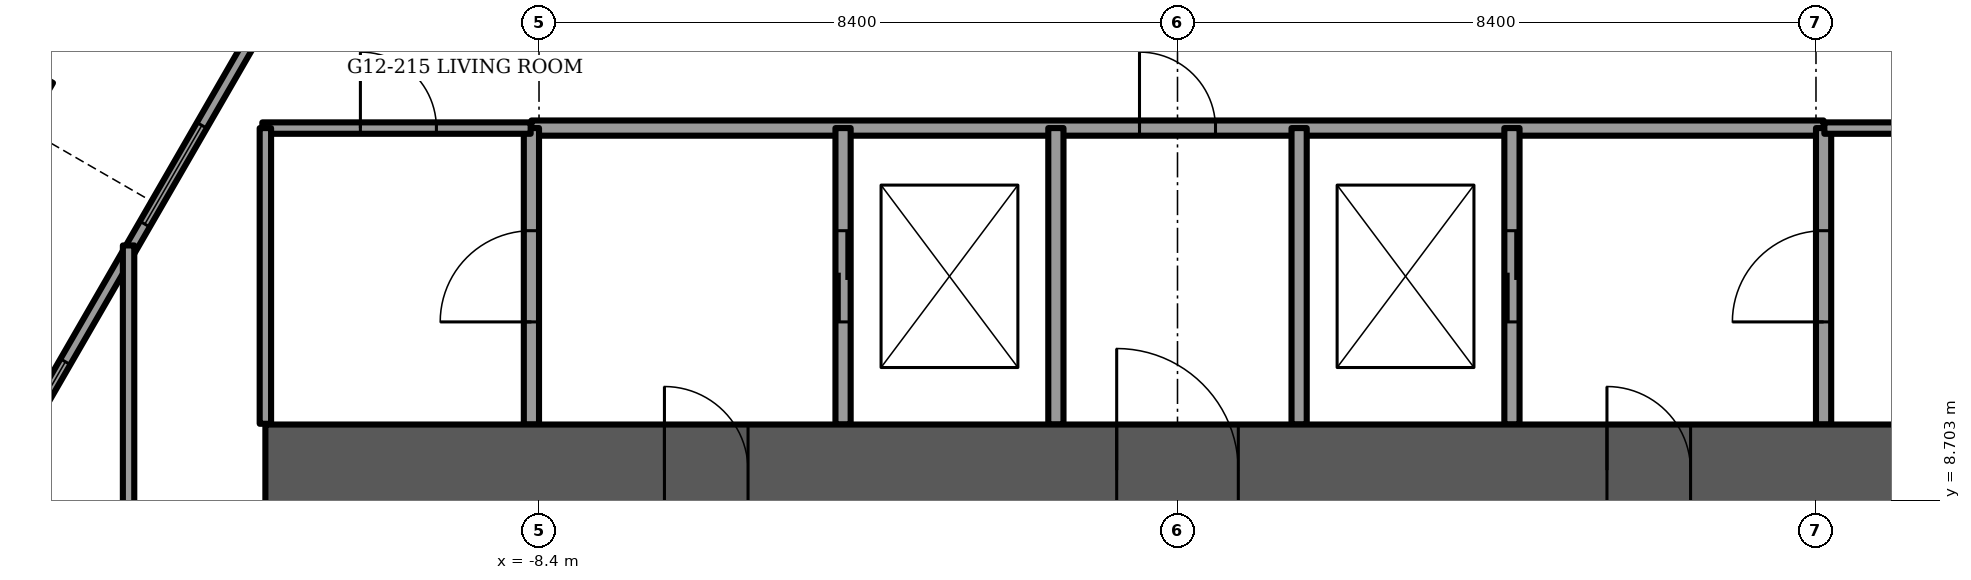
"""IFC4 building model, lengths in metres.
Left out: names, types, materials, properties, quantities, classifications, styles, units other than length and angle.
Written with IfcOpenShell. Run it as: python <this file> out.ifc"""

import sys

from ifc_helpers import new_model, si_unit, direction, frame, frame_2d, origin, origin_2d, place, context, subcontext, project, spatial, rectangle, extrude, element, fill, save


model = new_model("IFC4")
c1 = context("Model", 3, precision=1e-05, world=origin(), true_north=direction((0.0, 1.0)))
c2 = subcontext(c1, "Body", "Model", "MODEL_VIEW")
j1 = project(units=[si_unit("LENGTHUNIT", "METRE"), si_unit("PLANEANGLEUNIT", "RADIAN")], contexts=[c1])
p1 = place(None, origin())
s1 = spatial("IfcSite", under=j1, at=p1, CompositionType="ELEMENT")
p2 = place(p1, origin())
s2 = spatial("IfcBuilding", under=s1, at=p2, CompositionType="ELEMENT")
p3 = place(p2, frame((0.0, 0.0, 50.5)))
s3 = spatial("IfcBuildingStorey", under=s2, at=p3, CompositionType="ELEMENT", Elevation=50.5)
p4 = place(p3, frame((-15.75, 13.938, -1.2), z_axis=(0.0, 0.0, 1.0), x_axis=(0.5, 0.866025403784, 0.0)))
e1 = element("IfcColumn", 1, at=p4, inside=s3, PredefinedType="COLUMN", context=c2, shape_type="SweptSolid", body=[
    extrude(rectangle(XDim=1.4, YDim=1.4, at=origin_2d()), origin(), (0.0, 0.0, 1.0), 3.75),
])
p5 = place(p3, frame((-12.0, 9.1, -0.3), z_axis=(0.0, 0.0, 1.0), x_axis=(1.0, 0.0, 0.0)))
e2 = element("IfcWall", 2, at=p5, inside=s3, PredefinedType="SHEAR", context=c2, shape_type="SweptSolid", body=[
    extrude(rectangle(XDim=24.0, YDim=1.2, at=frame_2d((12.0, 0.0))), origin(), (0.0, 0.0, 1.0), 3.75),
])
p6 = place(p5, frame((11.2, 0.0, 0.0)))
e3 = element("IfcOpeningElement", 3, at=p6, cuts=e2, PredefinedType="OPENING", context=c2, shape_type="SweptSolid", body=[
    extrude(rectangle(XDim=1.6, YDim=2.1, at=frame_2d((0.8, 1.05))), frame((0.0, 0.6, 0.0), z_axis=(0.0, -1.0, 0.0), x_axis=(1.0, 0.0, 0.0)), (0.0, 0.0, 1.0), 1.2),
])
p7 = place(p5, frame((5.25, 0.0, 0.0)))
e4 = element("IfcOpeningElement", 4, at=p7, cuts=e2, PredefinedType="OPENING", context=c2, shape_type="SweptSolid", body=[
    extrude(rectangle(XDim=1.1, YDim=2.1, at=frame_2d((0.55, 1.05))), frame((0.0, 0.6, 0.0), z_axis=(0.0, -1.0, 0.0), x_axis=(1.0, 0.0, 0.0)), (0.0, 0.0, 1.0), 1.2),
])
p8 = place(p5, frame((17.65, 0.0, 0.0)))
e5 = element("IfcOpeningElement", 5, at=p8, cuts=e2, PredefinedType="OPENING", context=c2, shape_type="SweptSolid", body=[
    extrude(rectangle(XDim=1.1, YDim=2.1, at=frame_2d((0.55, 1.05))), frame((0.0, 0.6, 0.0), z_axis=(0.0, -1.0, 0.0), x_axis=(1.0, 0.0, 0.0)), (0.0, 0.0, 1.0), 1.2),
])
p9 = place(p3, frame((-12.138, 20.694, 0.0), z_axis=(0.0, 0.0, 1.0), x_axis=(-0.500009789943, -0.866019751484, 0.0)))
e6 = element("IfcWall", 6, at=p9, inside=s3, PredefinedType="PARAPET", context=c2, shape_type="SweptSolid", body=[
    extrude(rectangle(XDim=6.987, YDim=0.9, at=frame_2d((3.494, 0.0))), origin(), (0.0, 0.0, 1.0), 1.1),
])
p10 = place(p3, frame((-8.993, 20.292, 0.0), z_axis=(0.0, 0.0, 1.0), x_axis=(-0.49999960747, -0.866025630412, 0.0)))
e7 = element("IfcWall", 7, at=p10, inside=s3, PredefinedType="SOLIDWALL", context=c2, shape_type="SweptSolid", body=[
    extrude(rectangle(XDim=23.384, YDim=0.15, at=frame_2d((11.692, 0.0))), origin(), (0.0, 0.0, 1.0), 3.45),
])
p11 = place(p10, frame((3.825, 0.0, 0.15)))
e8 = element("IfcOpeningElement", 8, at=p11, cuts=e7, PredefinedType="OPENING", context=c2, shape_type="SweptSolid", body=[
    extrude(rectangle(XDim=1.5, YDim=2.85, at=frame_2d((0.75, 1.425))), frame((0.0, 0.075, 0.0), z_axis=(0.0, -1.0, 0.0), x_axis=(1.0, 0.0, 0.0)), (0.0, 0.0, 1.0), 0.15),
])
p12 = place(p10, frame((7.687, 0.0, 0.15)))
e9 = element("IfcOpeningElement", 9, at=p12, cuts=e7, PredefinedType="OPENING", context=c2, shape_type="SweptSolid", body=[
    extrude(rectangle(XDim=1.5, YDim=2.85, at=frame_2d((0.75, 1.425))), frame((0.0, 0.075, 0.0), z_axis=(0.0, -1.0, 0.0), x_axis=(1.0, 0.0, 0.0)), (0.0, 0.0, 1.0), 0.15),
])
p13 = place(p10, frame((11.278, 0.0, 0.15)))
e10 = element("IfcOpeningElement", 10, at=p13, cuts=e7, PredefinedType="OPENING", context=c2, shape_type="SweptSolid", body=[
    extrude(rectangle(XDim=1.8, YDim=2.85, at=frame_2d((0.9, 1.425))), frame((0.0, 0.075, 0.0), z_axis=(0.0, -1.0, 0.0), x_axis=(1.0, 0.0, 0.0)), (0.0, 0.0, 1.0), 0.15),
])
p14 = place(p10, frame((13.377, 0.0, 0.15)))
e11 = element("IfcOpeningElement", 11, at=p14, cuts=e7, PredefinedType="OPENING", context=c2, shape_type="SweptSolid", body=[
    extrude(rectangle(XDim=1.5, YDim=2.85, at=frame_2d((0.75, 1.425))), frame((0.0, 0.075, 0.0), z_axis=(0.0, -1.0, 0.0), x_axis=(1.0, 0.0, 0.0)), (0.0, 0.0, 1.0), 0.15),
])
p15 = place(p10, frame((15.478, 0.0, 0.15)))
e12 = element("IfcOpeningElement", 12, at=p15, cuts=e7, PredefinedType="OPENING", context=c2, shape_type="SweptSolid", body=[
    extrude(rectangle(XDim=1.8, YDim=2.85, at=frame_2d((0.9, 1.425))), frame((0.0, 0.075, 0.0), z_axis=(0.0, -1.0, 0.0), x_axis=(1.0, 0.0, 0.0)), (0.0, 0.0, 1.0), 0.15),
])
p16 = place(p10, frame((17.577, 0.0, 0.15)))
e13 = element("IfcOpeningElement", 13, at=p16, cuts=e7, PredefinedType="OPENING", context=c2, shape_type="SweptSolid", body=[
    extrude(rectangle(XDim=1.5, YDim=2.85, at=frame_2d((0.75, 1.425))), frame((0.0, 0.075, 0.0), z_axis=(0.0, -1.0, 0.0), x_axis=(1.0, 0.0, 0.0)), (0.0, 0.0, 1.0), 0.15),
])
p17 = place(p10, frame((0.339, 0.0, 0.15)))
e14 = element("IfcOpeningElement", 14, at=p17, cuts=e7, PredefinedType="OPENING", context=c2, shape_type="SweptSolid", body=[
    extrude(rectangle(XDim=1.8, YDim=2.73, at=frame_2d((0.9, 1.365))), frame((0.0, 0.075, 0.0), z_axis=(0.0, -1.0, 0.0), x_axis=(1.0, 0.0, 0.0)), (0.0, 0.0, 1.0), 0.15),
])
p18 = place(p10, frame((21.12, 0.0, 0.15)))
e15 = element("IfcOpeningElement", 15, at=p18, cuts=e7, PredefinedType="OPENING", context=c2, shape_type="SweptSolid", body=[
    extrude(rectangle(XDim=1.8, YDim=2.73, at=frame_2d((0.9, 1.365))), frame((0.0, 0.075, 0.0), z_axis=(0.0, -1.0, 0.0), x_axis=(1.0, 0.0, 0.0)), (0.0, 0.0, 1.0), 0.15),
])
p19 = place(p3, frame((20.685, 0.042, 0.0), z_axis=(0.0, 0.0, 1.0), x_axis=(-0.49999960747, 0.866025630412, 0.0)))
e16 = element("IfcWall", 16, at=p19, inside=s3, PredefinedType="SOLIDWALL", context=c2, shape_type="SweptSolid", body=[
    extrude(rectangle(XDim=23.384, YDim=0.15, at=frame_2d((11.692, 0.0))), origin(), (0.0, 0.0, 1.0), 3.45),
])
p20 = place(p19, frame((4.491, 0.0, 0.15)))
e17 = element("IfcOpeningElement", 17, at=p20, cuts=e16, PredefinedType="OPENING", context=c2, shape_type="SweptSolid", body=[
    extrude(rectangle(XDim=1.8, YDim=2.85, at=frame_2d((0.9, 1.425))), frame((0.0, 0.075, 0.0), z_axis=(0.0, -1.0, 0.0), x_axis=(1.0, 0.0, 0.0)), (0.0, 0.0, 1.0), 0.15),
])
p21 = place(p19, frame((6.406, 0.0, 0.15)))
e18 = element("IfcOpeningElement", 18, at=p21, cuts=e16, PredefinedType="OPENING", context=c2, shape_type="SweptSolid", body=[
    extrude(rectangle(XDim=1.5, YDim=2.85, at=frame_2d((0.75, 1.425))), frame((0.0, 0.075, 0.0), z_axis=(0.0, -1.0, 0.0), x_axis=(1.0, 0.0, 0.0)), (0.0, 0.0, 1.0), 0.15),
])
p22 = place(p19, frame((8.506, 0.0, 0.15)))
e19 = element("IfcOpeningElement", 19, at=p22, cuts=e16, PredefinedType="OPENING", context=c2, shape_type="SweptSolid", body=[
    extrude(rectangle(XDim=1.8, YDim=2.85, at=frame_2d((0.9, 1.425))), frame((0.0, 0.075, 0.0), z_axis=(0.0, -1.0, 0.0), x_axis=(1.0, 0.0, 0.0)), (0.0, 0.0, 1.0), 0.15),
])
p23 = place(p19, frame((10.606, 0.0, 0.15)))
e20 = element("IfcOpeningElement", 20, at=p23, cuts=e16, PredefinedType="OPENING", context=c2, shape_type="SweptSolid", body=[
    extrude(rectangle(XDim=1.5, YDim=2.85, at=frame_2d((0.75, 1.425))), frame((0.0, 0.075, 0.0), z_axis=(0.0, -1.0, 0.0), x_axis=(1.0, 0.0, 0.0)), (0.0, 0.0, 1.0), 0.15),
])
p24 = place(p19, frame((14.806, 0.0, 0.15)))
e21 = element("IfcOpeningElement", 21, at=p24, cuts=e16, PredefinedType="OPENING", context=c2, shape_type="SweptSolid", body=[
    extrude(rectangle(XDim=1.5, YDim=2.85, at=frame_2d((0.75, 1.425))), frame((0.0, 0.075, 0.0), z_axis=(0.0, -1.0, 0.0), x_axis=(1.0, 0.0, 0.0)), (0.0, 0.0, 1.0), 0.15),
])
p25 = place(p19, frame((18.861, 0.0, 0.15)))
e22 = element("IfcOpeningElement", 22, at=p25, cuts=e16, PredefinedType="OPENING", context=c2, shape_type="SweptSolid", body=[
    extrude(rectangle(XDim=1.5, YDim=2.85, at=frame_2d((0.75, 1.425))), frame((0.0, 0.075, 0.0), z_axis=(0.0, -1.0, 0.0), x_axis=(1.0, 0.0, 0.0)), (0.0, 0.0, 1.0), 0.15),
])
p26 = place(p19, frame((1.422, 0.0, 0.15)))
e23 = element("IfcOpeningElement", 23, at=p26, cuts=e16, PredefinedType="OPENING", context=c2, shape_type="SweptSolid", body=[
    extrude(rectangle(XDim=1.8, YDim=2.73, at=frame_2d((0.9, 1.365))), frame((0.0, 0.075, 0.0), z_axis=(0.0, -1.0, 0.0), x_axis=(1.0, 0.0, 0.0)), (0.0, 0.0, 1.0), 0.15),
])
p27 = place(p19, frame((21.247, 0.0, 0.15)))
e24 = element("IfcOpeningElement", 24, at=p27, cuts=e16, PredefinedType="OPENING", context=c2, shape_type="SweptSolid", body=[
    extrude(rectangle(XDim=1.8, YDim=2.73, at=frame_2d((0.9, 1.365))), frame((0.0, 0.075, 0.0), z_axis=(0.0, -1.0, 0.0), x_axis=(1.0, 0.0, 0.0)), (0.0, 0.0, 1.0), 0.15),
])
p28 = place(p3, frame((-8.5, 13.6, 0.0), z_axis=(0.0, 0.0, 1.0), x_axis=(1.0, 0.0, 0.0)))
e25 = element("IfcWall", 25, at=p28, inside=s3, PredefinedType="PARTITIONING", context=c2, shape_type="SweptSolid", body=[
    extrude(rectangle(XDim=17.0, YDim=0.2, at=frame_2d((8.5, 0.0))), origin(), (0.0, 0.0, 1.0), 3.45),
])
p29 = place(p28, frame((8.0, 0.0, 0.0)))
e26 = element("IfcOpeningElement", 26, at=p29, cuts=e25, PredefinedType="OPENING", context=c2, shape_type="SweptSolid", body=[
    extrude(rectangle(XDim=1.0, YDim=2.1, at=frame_2d((0.5, 1.05))), frame((0.0, 0.1, 0.0), z_axis=(0.0, -1.0, 0.0), x_axis=(1.0, 0.0, 0.0)), (0.0, 0.0, 1.0), 0.2),
])
p30 = place(p3, frame((-8.5, 9.7, 0.0), z_axis=(0.0, 0.0, 1.0), x_axis=(0.0, 1.0, 0.0)))
e27 = element("IfcWall", 27, at=p30, inside=s3, PredefinedType="PARTITIONING", context=c2, shape_type="SweptSolid", body=[
    extrude(rectangle(XDim=3.9, YDim=0.2, at=frame_2d((1.95, 0.0))), origin(), (0.0, 0.0, 1.0), 3.45),
])
p31 = place(p30, frame((1.35, 0.0, 0.0)))
e28 = element("IfcOpeningElement", 28, at=p31, cuts=e27, PredefinedType="OPENING", context=c2, shape_type="SweptSolid", body=[
    extrude(rectangle(XDim=1.2, YDim=2.1, at=frame_2d((0.6, 1.05))), frame((0.0, 0.1, 0.0), z_axis=(0.0, -1.0, 0.0), x_axis=(1.0, 0.0, 0.0)), (0.0, 0.0, 1.0), 0.2),
])
p32 = place(p3, frame((8.5, 9.7, 0.0), z_axis=(0.0, 0.0, 1.0), x_axis=(0.0, 1.0, 0.0)))
e29 = element("IfcWall", 29, at=p32, inside=s3, PredefinedType="PARTITIONING", context=c2, shape_type="SweptSolid", body=[
    extrude(rectangle(XDim=3.9, YDim=0.2, at=frame_2d((1.95, 0.0))), origin(), (0.0, 0.0, 1.0), 3.45),
])
p33 = place(p32, frame((1.35, 0.0, 0.0)))
e30 = element("IfcOpeningElement", 30, at=p33, cuts=e29, PredefinedType="OPENING", context=c2, shape_type="SweptSolid", body=[
    extrude(rectangle(XDim=1.2, YDim=2.1, at=frame_2d((0.6, 1.05))), frame((0.0, 0.1, 0.0), z_axis=(0.0, -1.0, 0.0), x_axis=(1.0, 0.0, 0.0)), (0.0, 0.0, 1.0), 0.2),
])
p34 = place(p3, frame((-4.4, 9.7, 0.0), z_axis=(0.0, 0.0, 1.0), x_axis=(0.0, 1.0, 0.0)))
e31 = element("IfcWall", 31, at=p34, inside=s3, PredefinedType="PARTITIONING", context=c2, shape_type="SweptSolid", body=[
    extrude(rectangle(XDim=3.9, YDim=0.2, at=frame_2d((1.95, 0.0))), origin(), (0.0, 0.0, 1.0), 3.45),
])
p35 = place(p34, frame((1.35, 0.0, 0.0)))
e32 = element("IfcOpeningElement", 32, at=p35, cuts=e31, PredefinedType="OPENING", context=c2, shape_type="SweptSolid", body=[
    extrude(rectangle(XDim=1.2, YDim=2.1, at=frame_2d((0.6, 1.05))), frame((0.0, 0.1, 0.0), z_axis=(0.0, -1.0, 0.0), x_axis=(1.0, 0.0, 0.0)), (0.0, 0.0, 1.0), 0.2),
])
p36 = place(p3, frame((4.4, 9.7, 0.0), z_axis=(0.0, 0.0, 1.0), x_axis=(0.0, 1.0, 0.0)))
e33 = element("IfcWall", 33, at=p36, inside=s3, PredefinedType="PARTITIONING", context=c2, shape_type="SweptSolid", body=[
    extrude(rectangle(XDim=3.9, YDim=0.2, at=frame_2d((1.95, 0.0))), origin(), (0.0, 0.0, 1.0), 3.45),
])
p37 = place(p36, frame((1.35, 0.0, 0.0)))
e34 = element("IfcOpeningElement", 34, at=p37, cuts=e33, PredefinedType="OPENING", context=c2, shape_type="SweptSolid", body=[
    extrude(rectangle(XDim=1.2, YDim=2.1, at=frame_2d((0.6, 1.05))), frame((0.0, 0.1, 0.0), z_axis=(0.0, -1.0, 0.0), x_axis=(1.0, 0.0, 0.0)), (0.0, 0.0, 1.0), 0.2),
])
for number, where, z_axis, x_axis in (
    (35, (-1.6, 9.7, 0.0), (0.0, 0.0, 1.0), (0.0, 1.0, 0.0)),
    (36, (1.6, 9.7, 0.0), (0.0, 0.0, 1.0), (0.0, 1.0, 0.0)),
):
    element("IfcWall", number, at=place(p3, frame(where, z_axis=z_axis, x_axis=x_axis)), inside=s3, PredefinedType="PARTITIONING", context=c2, shape_type="SweptSolid", body=[
        extrude(rectangle(XDim=3.9, YDim=0.2, at=frame_2d((1.95, 0.0))), origin(), (0.0, 0.0, 1.0), 3.45),
    ])
p38 = place(p3, frame((-12.04, 13.6, 0.0), z_axis=(0.0, 0.0, 1.0), x_axis=(1.0, 0.0, 0.0)))
e37 = element("IfcWall", 37, at=p38, inside=s3, PredefinedType="PARTITIONING", context=c2, shape_type="SweptSolid", body=[
    extrude(rectangle(XDim=3.53, YDim=0.15, at=frame_2d((1.765, 0.0))), origin(), (0.0, 0.0, 1.0), 3.45),
])
p39 = place(p38, frame((1.29, 0.0, 0.0)))
e38 = element("IfcOpeningElement", 38, at=p39, cuts=e37, PredefinedType="OPENING", context=c2, shape_type="SweptSolid", body=[
    extrude(rectangle(XDim=1.0, YDim=2.1, at=frame_2d((0.5, 1.05))), frame((0.0, 0.075, 0.0), z_axis=(0.0, -1.0, 0.0), x_axis=(1.0, 0.0, 0.0)), (0.0, 0.0, 1.0), 0.15),
])
p40 = place(p3, frame((8.51, 13.6, 0.0), z_axis=(0.0, 0.0, 1.0), x_axis=(1.0, 0.0, 0.0)))
e39 = element("IfcWall", 39, at=p40, inside=s3, PredefinedType="PARTITIONING", context=c2, shape_type="SweptSolid", body=[
    extrude(rectangle(XDim=3.53, YDim=0.15, at=frame_2d((1.765, 0.0))), origin(), (0.0, 0.0, 1.0), 3.45),
])
p41 = place(p40, frame((1.24, 0.0, 0.0)))
e40 = element("IfcOpeningElement", 40, at=p41, cuts=e39, PredefinedType="OPENING", context=c2, shape_type="SweptSolid", body=[
    extrude(rectangle(XDim=1.0, YDim=2.1, at=frame_2d((0.5, 1.05))), frame((0.0, 0.075, 0.0), z_axis=(0.0, -1.0, 0.0), x_axis=(1.0, 0.0, 0.0)), (0.0, 0.0, 1.0), 0.15),
])
p42 = place(p3, frame((-12.0, 9.71, 0.0), z_axis=(0.0, 0.0, 1.0), x_axis=(0.0, 1.0, 0.0)))
e41 = element("IfcWall", 41, at=p42, inside=s3, PredefinedType="PARTITIONING", context=c2, shape_type="SweptSolid", body=[
    extrude(rectangle(XDim=3.89, YDim=0.15, at=frame_2d((1.945, 0.0))), origin(), (0.0, 0.0, 1.0), 3.45),
])
p43 = place(p3, frame((-13.8, -3.7, 0.0), z_axis=(0.0, 0.0, 1.0), x_axis=(0.0, 1.0, 0.0)))
e42 = element("IfcWall", 42, at=p43, inside=s3, PredefinedType="PARTITIONING", context=c2, shape_type="SweptSolid", body=[
    extrude(rectangle(XDim=15.756, YDim=0.15, at=frame_2d((7.878, 0.0))), origin(), (0.0, 0.0, 1.0), 3.45),
])
p44 = place(p43, frame((0.55, 0.0, 0.0)))
e43 = element("IfcOpeningElement", 43, at=p44, cuts=e42, PredefinedType="OPENING", context=c2, shape_type="SweptSolid", body=[
    extrude(rectangle(XDim=1.0, YDim=2.1, at=frame_2d((0.5, 1.05))), frame((0.0, 0.075, 0.0), z_axis=(0.0, -1.0, 0.0), x_axis=(1.0, 0.0, 0.0)), (0.0, 0.0, 1.0), 0.15),
])
p45 = place(p43, frame((2.35, 0.0, 0.0)))
e44 = element("IfcOpeningElement", 44, at=p45, cuts=e42, PredefinedType="OPENING", context=c2, shape_type="SweptSolid", body=[
    extrude(rectangle(XDim=1.0, YDim=2.1, at=frame_2d((0.5, 1.05))), frame((0.0, 0.075, 0.0), z_axis=(0.0, -1.0, 0.0), x_axis=(1.0, 0.0, 0.0)), (0.0, 0.0, 1.0), 0.15),
])
p46 = place(p43, frame((10.407, 0.0, 0.0)))
e45 = element("IfcOpeningElement", 45, at=p46, cuts=e42, PredefinedType="OPENING", context=c2, shape_type="SweptSolid", body=[
    extrude(rectangle(XDim=1.0, YDim=2.1, at=frame_2d((0.5, 1.05))), frame((0.0, 0.075, 0.0), z_axis=(0.0, -1.0, 0.0), x_axis=(1.0, 0.0, 0.0)), (0.0, 0.0, 1.0), 0.15),
])
p47 = place(p12, origin())
e46 = element("IfcWindow", 46, at=p47, inside=s3, PartitioningType="SINGLE_PANEL", PredefinedType="WINDOW", context=c2, shape_type="SweptSolid", body=[
    extrude(rectangle(XDim=1.5, YDim=2.85, at=frame_2d((0.75, 1.425))), frame((0.0, 0.03, 0.0), z_axis=(0.0, -1.0, 0.0), x_axis=(1.0, 0.0, 0.0)), (0.0, 0.0, 1.0), 0.06),
])
fill(e9, e46)
p48 = place(p13, origin())
e47 = element("IfcWindow", 47, at=p48, inside=s3, PartitioningType="SINGLE_PANEL", PredefinedType="WINDOW", context=c2, shape_type="SweptSolid", body=[
    extrude(rectangle(XDim=1.8, YDim=2.85, at=frame_2d((0.9, 1.425))), frame((0.0, 0.03, 0.0), z_axis=(0.0, -1.0, 0.0), x_axis=(1.0, 0.0, 0.0)), (0.0, 0.0, 1.0), 0.06),
])
fill(e10, e47)
p49 = place(p6, origin())
e48 = element("IfcDoor", 48, at=p49, inside=s3, OperationType="DOUBLE_DOOR_SINGLE_SWING", PredefinedType="DOOR", context=c2, shape_type="SweptSolid", body=[
    extrude(rectangle(XDim=1.6, YDim=2.1, at=frame_2d((0.8, 1.05))), frame((0.0, 0.025, 0.0), z_axis=(0.0, -1.0, 0.0), x_axis=(1.0, 0.0, 0.0)), (0.0, 0.0, 1.0), 0.05),
])
fill(e3, e48)
p50 = place(p7, origin())
e49 = element("IfcDoor", 49, at=p50, inside=s3, OperationType="SINGLE_SWING_LEFT", PredefinedType="DOOR", context=c2, shape_type="SweptSolid", body=[
    extrude(rectangle(XDim=1.1, YDim=2.1, at=frame_2d((0.55, 1.05))), frame((0.0, 0.025, 0.0), z_axis=(0.0, -1.0, 0.0), x_axis=(1.0, 0.0, 0.0)), (0.0, 0.0, 1.0), 0.05),
])
fill(e4, e49)
p51 = place(p8, origin())
e50 = element("IfcDoor", 50, at=p51, inside=s3, OperationType="SINGLE_SWING_RIGHT", PredefinedType="DOOR", context=c2, shape_type="SweptSolid", body=[
    extrude(rectangle(XDim=1.1, YDim=2.1, at=frame_2d((0.55, 1.05))), frame((0.0, 0.025, 0.0), z_axis=(0.0, -1.0, 0.0), x_axis=(1.0, 0.0, 0.0)), (0.0, 0.0, 1.0), 0.05),
])
fill(e5, e50)
p52 = place(p35, origin())
e51 = element("IfcDoor", 51, at=p52, inside=s3, OperationType="SLIDING_TO_LEFT", PredefinedType="DOOR", context=c2, shape_type="SweptSolid", body=[
    extrude(rectangle(XDim=1.2, YDim=2.1, at=frame_2d((0.6, 1.05))), frame((0.0, 0.025, 0.0), z_axis=(0.0, -1.0, 0.0), x_axis=(1.0, 0.0, 0.0)), (0.0, 0.0, 1.0), 0.05),
])
fill(e32, e51)
p53 = place(p31, origin())
e52 = element("IfcDoor", 52, at=p53, inside=s3, OperationType="SINGLE_SWING_LEFT", PredefinedType="DOOR", context=c2, shape_type="SweptSolid", body=[
    extrude(rectangle(XDim=1.2, YDim=2.1, at=frame_2d((0.6, 1.05))), frame((0.0, 0.025, 0.0), z_axis=(0.0, -1.0, 0.0), x_axis=(1.0, 0.0, 0.0)), (0.0, 0.0, 1.0), 0.05),
])
fill(e28, e52)
p54 = place(p37, origin())
e53 = element("IfcDoor", 53, at=p54, inside=s3, OperationType="SLIDING_TO_LEFT", PredefinedType="DOOR", context=c2, shape_type="SweptSolid", body=[
    extrude(rectangle(XDim=1.2, YDim=2.1, at=frame_2d((0.6, 1.05))), frame((0.0, 0.025, 0.0), z_axis=(0.0, -1.0, 0.0), x_axis=(1.0, 0.0, 0.0)), (0.0, 0.0, 1.0), 0.05),
])
fill(e34, e53)
p55 = place(p33, origin())
e54 = element("IfcDoor", 54, at=p55, inside=s3, OperationType="SINGLE_SWING_LEFT", PredefinedType="DOOR", context=c2, shape_type="SweptSolid", body=[
    extrude(rectangle(XDim=1.2, YDim=2.1, at=frame_2d((0.6, 1.05))), frame((0.0, 0.025, 0.0), z_axis=(0.0, -1.0, 0.0), x_axis=(1.0, 0.0, 0.0)), (0.0, 0.0, 1.0), 0.05),
])
fill(e30, e54)
p56 = place(p29, origin())
e55 = element("IfcDoor", 55, at=p56, inside=s3, OperationType="SINGLE_SWING_LEFT", PredefinedType="DOOR", context=c2, shape_type="SweptSolid", body=[
    extrude(rectangle(XDim=1.0, YDim=2.1, at=frame_2d((0.5, 1.05))), frame((0.0, 0.025, 0.0), z_axis=(0.0, -1.0, 0.0), x_axis=(1.0, 0.0, 0.0)), (0.0, 0.0, 1.0), 0.05),
])
fill(e26, e55)
p57 = place(p39, origin())
e56 = element("IfcDoor", 56, at=p57, inside=s3, OperationType="SINGLE_SWING_RIGHT", PredefinedType="DOOR", context=c2, shape_type="SweptSolid", body=[
    extrude(rectangle(XDim=1.0, YDim=2.1, at=frame_2d((0.5, 1.05))), frame((0.0, 0.025, 0.0), z_axis=(0.0, -1.0, 0.0), x_axis=(1.0, 0.0, 0.0)), (0.0, 0.0, 1.0), 0.05),
])
fill(e38, e56)
save(model, sys.argv[1])
